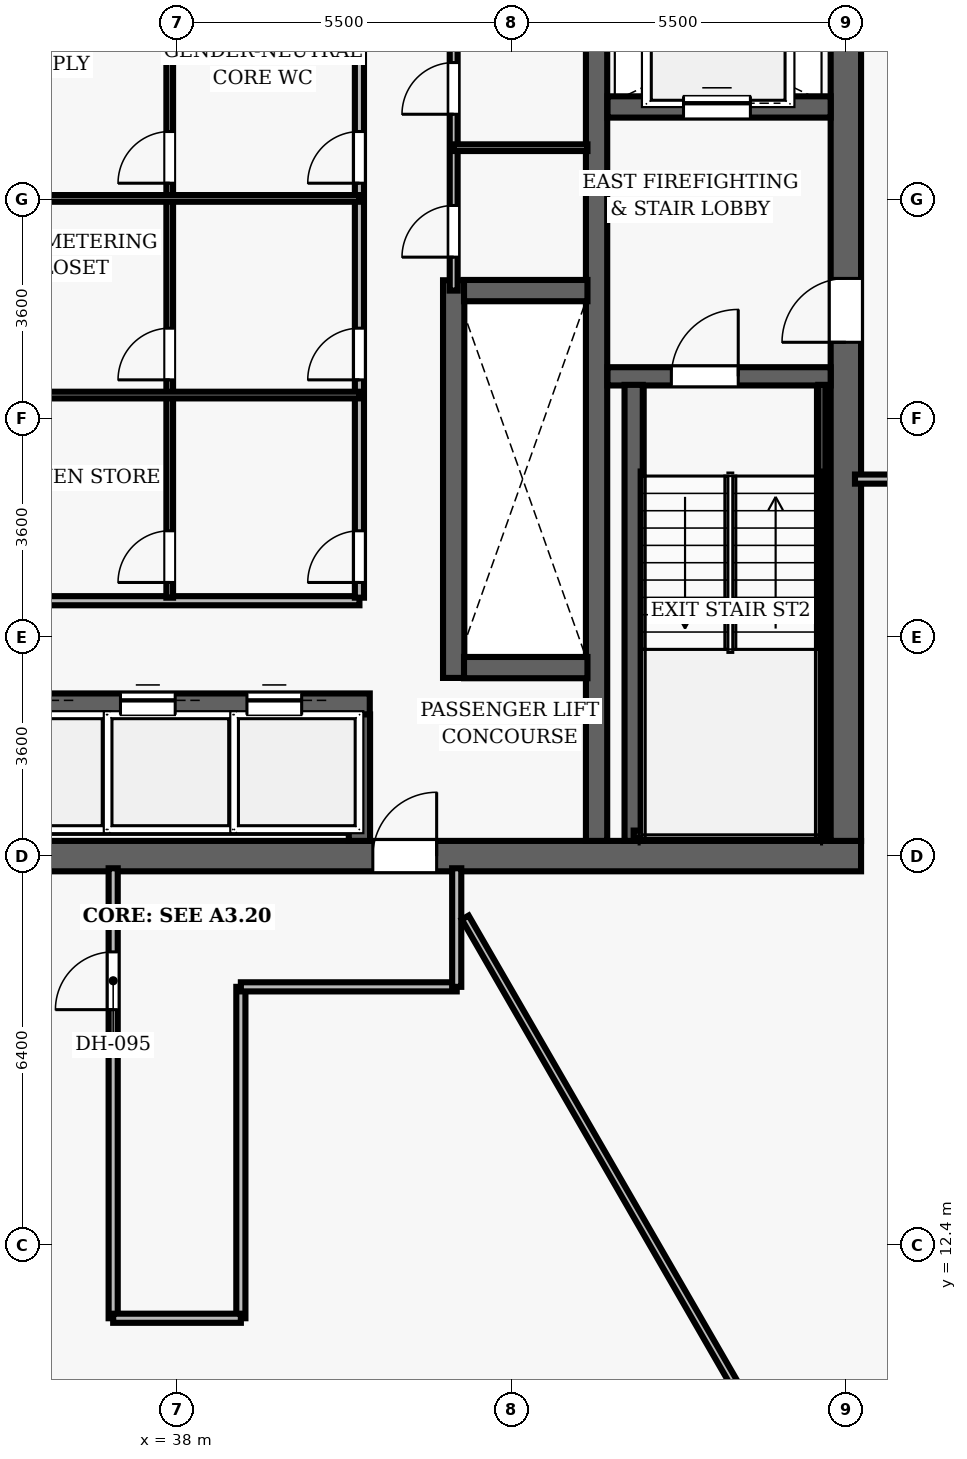
"""IFC4 building model, lengths in metres.
Left out: names, types, materials, properties, quantities, classifications, styles, units other than length and angle.
Written with IfcOpenShell. Run it as: python <this file> out.ifc"""

import sys

from ifc_helpers import new_model, si_unit, direction, frame, frame_2d, origin, place, context, subcontext, project, spatial, rectangle, extrude, element, fill, save


model = new_model("IFC4")
c1 = context("Model", 3, precision=1e-05, world=origin(), true_north=direction((0.0, 1.0)))
c2 = subcontext(c1, "Body", "Model", "MODEL_VIEW")
j1 = project(units=[si_unit("LENGTHUNIT", "METRE"), si_unit("PLANEANGLEUNIT", "RADIAN")], contexts=[c1])
p1 = place(None, origin())
s1 = spatial("IfcSite", under=j1, at=p1, CompositionType="ELEMENT")
p2 = place(p1, origin())
s2 = spatial("IfcBuilding", under=s1, at=p2, CompositionType="ELEMENT")
p3 = place(p2, frame((0.0, 0.0, 175.05)))
s3 = spatial("IfcBuildingStorey", under=s2, at=p3, CompositionType="ELEMENT", Elevation=175.05)
p4 = place(p3, frame((26.75, 18.8, 0.0), z_axis=(0.0, 0.0, 1.0), x_axis=(1.0, 0.0, 0.0)))
e1 = element("IfcWall", 1, at=p4, inside=s3, PredefinedType="SHEAR", context=c2, shape_type="SweptSolid", body=[
    extrude(rectangle(XDim=22.5, YDim=0.5, at=frame_2d((11.25, 0.0))), origin(), (0.0, 0.0, 1.0), 3.85),
])
p5 = place(p4, frame((14.47, 0.0, 0.0)))
e2 = element("IfcOpeningElement", 2, at=p5, cuts=e1, PredefinedType="OPENING", context=c2, shape_type="SweptSolid", body=[
    extrude(rectangle(XDim=1.05, YDim=2.15, at=frame_2d((0.525, 1.075))), frame((0.0, 0.26, 0.0), z_axis=(0.0, -1.0, 0.0), x_axis=(1.0, 0.0, 0.0)), (0.0, 0.0, 1.0), 0.52),
])
p6 = place(p3, frame((49.0, 19.05, 0.0), z_axis=(0.0, 0.0, 1.0), x_axis=(0.0, 1.0, 0.0)))
e3 = element("IfcWall", 3, at=p6, inside=s3, PredefinedType="SHEAR", context=c2, shape_type="SweptSolid", body=[
    extrude(rectangle(XDim=13.9, YDim=0.5, at=frame_2d((6.95, 0.0))), origin(), (0.0, 0.0, 1.0), 3.85),
])
p7 = place(p6, frame((8.2, 0.0, 0.0)))
e4 = element("IfcOpeningElement", 4, at=p7, cuts=e3, PredefinedType="OPENING", context=c2, shape_type="SweptSolid", body=[
    extrude(rectangle(XDim=1.05, YDim=2.15, at=frame_2d((0.525, 1.075))), frame((0.0, 0.26, 0.0), z_axis=(0.0, -1.0, 0.0), x_axis=(1.0, 0.0, 0.0)), (0.0, 0.0, 1.0), 0.52),
])
p8 = place(p3, frame((44.9, 19.05, 0.0), z_axis=(0.0, 0.0, 1.0), x_axis=(0.0, 1.0, 0.0)))
e5 = element("IfcWall", 5, at=p8, inside=s3, PredefinedType="SHEAR", context=c2, shape_type="SweptSolid", body=[
    extrude(rectangle(XDim=13.9, YDim=0.35, at=frame_2d((6.95, 0.0))), origin(), (0.0, 0.0, 1.0), 3.85),
])
p9 = place(p3, frame((45.08, 26.69, 0.0), z_axis=(0.0, 0.0, 1.0), x_axis=(1.0, 0.0, 0.0)))
e6 = element("IfcWall", 6, at=p9, inside=s3, PredefinedType="SHEAR", context=c2, shape_type="SweptSolid", body=[
    extrude(rectangle(XDim=3.67, YDim=0.3, at=frame_2d((1.835, 0.0))), origin(), (0.0, 0.0, 1.0), 3.85),
])
p10 = place(p9, frame((1.05, 0.0, 0.0)))
e7 = element("IfcOpeningElement", 7, at=p10, cuts=e6, PredefinedType="OPENING", context=c2, shape_type="SweptSolid", body=[
    extrude(rectangle(XDim=1.1, YDim=2.15, at=frame_2d((0.55, 1.075))), frame((0.0, 0.16, 0.0), z_axis=(0.0, -1.0, 0.0), x_axis=(1.0, 0.0, 0.0)), (0.0, 0.0, 1.0), 0.32),
])
p11 = place(p3, frame((45.51, 19.05, 0.0), z_axis=(0.0, 0.0, 1.0), x_axis=(0.0, 1.0, 0.0)))
e8 = element("IfcWall", 8, at=p11, inside=s3, PredefinedType="SHEAR", context=c2, shape_type="SweptSolid", body=[
    extrude(rectangle(XDim=7.5, YDim=0.3, at=frame_2d((3.75, 0.0))), origin(), (0.0, 0.0, 1.0), 3.85),
])
p12 = place(p3, frame((48.605, 19.1, 0.0), z_axis=(0.0, 0.0, 1.0), x_axis=(0.0, 1.0, 0.0)))
e9 = element("IfcWall", 9, at=p12, inside=s3, PredefinedType="SHEAR", context=c2, shape_type="SweptSolid", body=[
    extrude(rectangle(XDim=7.45, YDim=0.12, at=frame_2d((3.725, 0.0))), origin(), (0.0, 0.0, 1.0), 3.85),
])
p13 = place(p3, frame((45.51, 19.16, 0.0), z_axis=(0.0, 0.0, 1.0), x_axis=(1.0, 0.0, 0.0)))
e10 = element("IfcWall", 10, at=p13, inside=s3, PredefinedType="SHEAR", context=c2, shape_type="SweptSolid", body=[
    extrude(rectangle(XDim=3.095, YDim=0.12, at=frame_2d((1.547, 0.0))), origin(), (0.0, 0.0, 1.0), 3.85),
])
p14 = place(p3, frame((45.08, 31.12, 0.0), z_axis=(0.0, 0.0, 1.0), x_axis=(1.0, 0.0, 0.0)))
e11 = element("IfcWall", 11, at=p14, inside=s3, PredefinedType="SHEAR", context=c2, shape_type="SweptSolid", body=[
    extrude(rectangle(XDim=3.67, YDim=0.35, at=frame_2d((1.835, 0.0))), origin(), (0.0, 0.0, 1.0), 3.035),
])
p15 = place(p14, frame((1.25, 0.0, 0.0)))
e12 = element("IfcOpeningElement", 12, at=p15, cuts=e11, PredefinedType="OPENING", context=c2, shape_type="SweptSolid", body=[
    extrude(rectangle(XDim=1.1, YDim=2.15, at=frame_2d((0.55, 1.075))), frame((0.0, 0.185, 0.0), z_axis=(0.0, -1.0, 0.0), x_axis=(1.0, 0.0, 0.0)), (0.0, 0.0, 1.0), 0.37),
])
p16 = place(p3, frame((42.55, 21.73, 0.0), z_axis=(0.0, 0.0, 1.0), x_axis=(0.0, 1.0, 0.0)))
e13 = element("IfcWall", 13, at=p16, inside=s3, PredefinedType="SHEAR", context=c2, shape_type="SweptSolid", body=[
    extrude(rectangle(XDim=6.54, YDim=0.35, at=frame_2d((3.27, 0.0))), origin(), (0.0, 0.0, 1.0), 3.035),
])
for number, where, z_axis, x_axis in (
    (14, (42.72, 21.9, 0.0), (0.0, 0.0, 1.0), (1.0, 0.0, 0.0)),
    (15, (42.72, 28.1, 0.0), (0.0, 0.0, 1.0), (1.0, 0.0, 0.0)),
):
    element("IfcWall", number, at=place(p3, frame(where, z_axis=z_axis, x_axis=x_axis)), inside=s3, PredefinedType="SHEAR", context=c2, shape_type="SweptSolid", body=[
        extrude(rectangle(XDim=2.03, YDim=0.35, at=frame_2d((1.015, 0.0))), origin(), (0.0, 0.0, 1.0), 3.035),
    ])
p17 = place(p3, frame((34.49, 21.3, 0.0), z_axis=(0.0, 0.0, 1.0), x_axis=(1.0, 0.0, 0.0)))
e16 = element("IfcWall", 16, at=p17, inside=s3, PredefinedType="SHEAR", context=c2, shape_type="SweptSolid", body=[
    extrude(rectangle(XDim=6.68, YDim=0.35, at=frame_2d((3.34, 0.0))), origin(), (0.0, 0.0, 1.0), 3.035),
])
p18 = place(p17, frame((0.5, 0.0, 0.0)))
e17 = element("IfcOpeningElement", 17, at=p18, cuts=e16, PredefinedType="OPENING", context=c2, shape_type="SweptSolid", body=[
    extrude(rectangle(XDim=0.9, YDim=2.15, at=frame_2d((0.45, 1.075))), frame((0.0, 0.185, 0.0), z_axis=(0.0, -1.0, 0.0), x_axis=(1.0, 0.0, 0.0)), (0.0, 0.0, 1.0), 0.37),
])
p19 = place(p17, frame((2.58, 0.0, 0.0)))
e18 = element("IfcOpeningElement", 18, at=p19, cuts=e16, PredefinedType="OPENING", context=c2, shape_type="SweptSolid", body=[
    extrude(rectangle(XDim=0.9, YDim=2.15, at=frame_2d((0.45, 1.075))), frame((0.0, 0.185, 0.0), z_axis=(0.0, -1.0, 0.0), x_axis=(1.0, 0.0, 0.0)), (0.0, 0.0, 1.0), 0.37),
])
p20 = place(p17, frame((4.66, 0.0, 0.0)))
e19 = element("IfcOpeningElement", 19, at=p20, cuts=e16, PredefinedType="OPENING", context=c2, shape_type="SweptSolid", body=[
    extrude(rectangle(XDim=0.9, YDim=2.15, at=frame_2d((0.45, 1.075))), frame((0.0, 0.185, 0.0), z_axis=(0.0, -1.0, 0.0), x_axis=(1.0, 0.0, 0.0)), (0.0, 0.0, 1.0), 0.37),
])
p21 = place(p3, frame((41.0, 19.05, 0.0), z_axis=(0.0, 0.0, 1.0), x_axis=(0.0, 1.0, 0.0)))
e20 = element("IfcWall", 20, at=p21, inside=s3, PredefinedType="SHEAR", context=c2, shape_type="SweptSolid", body=[
    extrude(rectangle(XDim=2.08, YDim=0.35, at=frame_2d((1.04, 0.0))), origin(), (0.0, 0.0, 1.0), 3.035),
])
p22 = place(p3, frame((34.75, 23.0, 0.0), z_axis=(0.0, 0.0, 1.0), x_axis=(1.0, 0.0, 0.0)))
e21 = element("IfcWall", 21, at=p22, inside=s3, PredefinedType="PARTITIONING", context=c2, shape_type="SweptSolid", body=[
    extrude(rectangle(XDim=6.25, YDim=0.15, at=frame_2d((3.125, 0.0))), origin(), (0.0, 0.0, 1.0), 3.035),
])
p23 = place(p3, frame((41.0, 23.05, 0.0), z_axis=(0.0, 0.0, 1.0), x_axis=(0.0, 1.0, 0.0)))
e22 = element("IfcWall", 22, at=p23, inside=s3, PredefinedType="PARTITIONING", context=c2, shape_type="SweptSolid", body=[
    extrude(rectangle(XDim=9.8, YDim=0.15, at=frame_2d((4.9, 0.0))), origin(), (0.0, 0.0, 1.0), 3.035),
])
p24 = place(p23, frame((0.25, 0.0, 0.0)))
e23 = element("IfcOpeningElement", 23, at=p24, cuts=e22, PredefinedType="OPENING", context=c2, shape_type="SweptSolid", body=[
    extrude(rectangle(XDim=0.85, YDim=2.1, at=frame_2d((0.425, 1.05))), frame((0.0, 0.085, 0.0), z_axis=(0.0, -1.0, 0.0), x_axis=(1.0, 0.0, 0.0)), (0.0, 0.0, 1.0), 0.17),
])
p25 = place(p23, frame((3.582, 0.0, 0.0)))
e24 = element("IfcOpeningElement", 24, at=p25, cuts=e22, PredefinedType="OPENING", context=c2, shape_type="SweptSolid", body=[
    extrude(rectangle(XDim=0.85, YDim=2.1, at=frame_2d((0.425, 1.05))), frame((0.0, 0.085, 0.0), z_axis=(0.0, -1.0, 0.0), x_axis=(1.0, 0.0, 0.0)), (0.0, 0.0, 1.0), 0.17),
])
p26 = place(p23, frame((6.816, 0.0, 0.0)))
e25 = element("IfcOpeningElement", 25, at=p26, cuts=e22, PredefinedType="OPENING", context=c2, shape_type="SweptSolid", body=[
    extrude(rectangle(XDim=0.85, YDim=2.1, at=frame_2d((0.425, 1.05))), frame((0.0, 0.085, 0.0), z_axis=(0.0, -1.0, 0.0), x_axis=(1.0, 0.0, 0.0)), (0.0, 0.0, 1.0), 0.17),
])
p27 = place(p3, frame((37.88, 23.05, 0.0), z_axis=(0.0, 0.0, 1.0), x_axis=(0.0, 1.0, 0.0)))
e26 = element("IfcWall", 26, at=p27, inside=s3, PredefinedType="PARTITIONING", context=c2, shape_type="SweptSolid", body=[
    extrude(rectangle(XDim=9.8, YDim=0.11, at=frame_2d((4.9, 0.0))), origin(), (0.0, 0.0, 1.0), 3.035),
])
p28 = place(p27, frame((0.25, 0.0, 0.0)))
e27 = element("IfcOpeningElement", 27, at=p28, cuts=e26, PredefinedType="OPENING", context=c2, shape_type="SweptSolid", body=[
    extrude(rectangle(XDim=0.85, YDim=2.1, at=frame_2d((0.425, 1.05))), frame((0.0, 0.065, 0.0), z_axis=(0.0, -1.0, 0.0), x_axis=(1.0, 0.0, 0.0)), (0.0, 0.0, 1.0), 0.13),
])
p29 = place(p27, frame((3.582, 0.0, 0.0)))
e28 = element("IfcOpeningElement", 28, at=p29, cuts=e26, PredefinedType="OPENING", context=c2, shape_type="SweptSolid", body=[
    extrude(rectangle(XDim=0.85, YDim=2.1, at=frame_2d((0.425, 1.05))), frame((0.0, 0.065, 0.0), z_axis=(0.0, -1.0, 0.0), x_axis=(1.0, 0.0, 0.0)), (0.0, 0.0, 1.0), 0.13),
])
p30 = place(p27, frame((6.816, 0.0, 0.0)))
e29 = element("IfcOpeningElement", 29, at=p30, cuts=e26, PredefinedType="OPENING", context=c2, shape_type="SweptSolid", body=[
    extrude(rectangle(XDim=0.85, YDim=2.1, at=frame_2d((0.425, 1.05))), frame((0.0, 0.065, 0.0), z_axis=(0.0, -1.0, 0.0), x_axis=(1.0, 0.0, 0.0)), (0.0, 0.0, 1.0), 0.13),
])
for number, where, z_axis, x_axis in (
    (30, (34.75, 26.382, 0.0), (0.0, 0.0, 1.0), (1.0, 0.0, 0.0)),
    (31, (34.75, 29.616, 0.0), (0.0, 0.0, 1.0), (1.0, 0.0, 0.0)),
):
    element("IfcWall", number, at=place(p3, frame(where, z_axis=z_axis, x_axis=x_axis)), inside=s3, PredefinedType="PARTITIONING", context=c2, shape_type="SweptSolid", body=[
        extrude(rectangle(XDim=6.25, YDim=0.11, at=frame_2d((3.125, 0.0))), origin(), (0.0, 0.0, 1.0), 3.035),
    ])
p31 = place(p3, frame((42.55, 28.1, 0.0), z_axis=(0.0, 0.0, 1.0), x_axis=(0.0, 1.0, 0.0)))
e32 = element("IfcWall", 32, at=p31, inside=s3, PredefinedType="PARTITIONING", context=c2, shape_type="SweptSolid", body=[
    extrude(rectangle(XDim=4.75, YDim=0.13, at=frame_2d((2.375, 0.0))), origin(), (0.0, 0.0, 1.0), 3.035),
])
p32 = place(p31, frame((0.55, 0.0, 0.0)))
e33 = element("IfcOpeningElement", 33, at=p32, cuts=e32, PredefinedType="OPENING", context=c2, shape_type="SweptSolid", body=[
    extrude(rectangle(XDim=0.85, YDim=2.1, at=frame_2d((0.425, 1.05))), frame((0.0, 0.075, 0.0), z_axis=(0.0, -1.0, 0.0), x_axis=(1.0, 0.0, 0.0)), (0.0, 0.0, 1.0), 0.15),
])
p33 = place(p31, frame((2.9, 0.0, 0.0)))
e34 = element("IfcOpeningElement", 34, at=p33, cuts=e32, PredefinedType="OPENING", context=c2, shape_type="SweptSolid", body=[
    extrude(rectangle(XDim=0.85, YDim=2.1, at=frame_2d((0.425, 1.05))), frame((0.0, 0.075, 0.0), z_axis=(0.0, -1.0, 0.0), x_axis=(1.0, 0.0, 0.0)), (0.0, 0.0, 1.0), 0.15),
])
p34 = place(p3, frame((42.55, 30.45, 0.0), z_axis=(0.0, 0.0, 1.0), x_axis=(1.0, 0.0, 0.0)))
e35 = element("IfcWall", 35, at=p34, inside=s3, PredefinedType="PARTITIONING", context=c2, shape_type="SweptSolid", body=[
    extrude(rectangle(XDim=2.2, YDim=0.11, at=frame_2d((1.1, 0.0))), origin(), (0.0, 0.0, 1.0), 3.035),
])
p35 = place(p3, frame((49.15, 25.0, 0.0), z_axis=(0.0, 0.0, 1.0), x_axis=(1.0, 0.0, 0.0)))
e36 = element("IfcWall", 36, at=p35, inside=s3, PredefinedType="PARTITIONING", context=c2, shape_type="SweptSolid", body=[
    extrude(rectangle(XDim=11.303, YDim=0.15, at=frame_2d((5.652, 0.0))), origin(), (0.0, 0.0, 1.0), 3.035),
])
p36 = place(p35, frame((2.351, 0.0, 0.0)))
e37 = element("IfcOpeningElement", 37, at=p36, cuts=e36, PredefinedType="OPENING", context=c2, shape_type="SweptSolid", body=[
    extrude(rectangle(XDim=0.95, YDim=2.15, at=frame_2d((0.475, 1.075))), frame((0.0, 0.085, 0.0), z_axis=(0.0, -1.0, 0.0), x_axis=(1.0, 0.0, 0.0)), (0.0, 0.0, 1.0), 0.17),
])
p37 = place(p3, frame((36.95, 11.2, 0.0), z_axis=(0.0, 0.0, 1.0), x_axis=(0.0, 1.0, 0.0)))
e38 = element("IfcWall", 38, at=p37, inside=s3, PredefinedType="PARTITIONING", context=c2, shape_type="SweptSolid", body=[
    extrude(rectangle(XDim=7.4, YDim=0.15, at=frame_2d((3.7, 0.0))), origin(), (0.0, 0.0, 1.0), 3.035),
])
p38 = place(p37, frame((5.075, 0.0, 0.0)))
e39 = element("IfcOpeningElement", 39, at=p38, cuts=e38, PredefinedType="OPENING", context=c2, shape_type="SweptSolid", body=[
    extrude(rectangle(XDim=0.95, YDim=2.15, at=frame_2d((0.475, 1.075))), frame((0.0, 0.085, 0.0), z_axis=(0.0, -1.0, 0.0), x_axis=(1.0, 0.0, 0.0)), (0.0, 0.0, 1.0), 0.17),
])
p39 = place(p3, frame((39.05, 11.2, 0.0), z_axis=(0.0, 0.0, 1.0), x_axis=(0.0, 1.0, 0.0)))
e40 = element("IfcWall", 40, at=p39, inside=s3, PredefinedType="PARTITIONING", context=c2, shape_type="SweptSolid", body=[
    extrude(rectangle(XDim=5.45, YDim=0.15, at=frame_2d((2.725, 0.0))), origin(), (0.0, 0.0, 1.0), 3.035),
])
p40 = place(p3, frame((39.05, 16.65, 0.0), z_axis=(0.0, 0.0, 1.0), x_axis=(1.0, 0.0, 0.0)))
e41 = element("IfcWall", 41, at=p40, inside=s3, PredefinedType="PARTITIONING", context=c2, shape_type="SweptSolid", body=[
    extrude(rectangle(XDim=3.55, YDim=0.15, at=frame_2d((1.775, 0.0))), origin(), (0.0, 0.0, 1.0), 3.035),
])
p41 = place(p3, frame((42.6, 16.65, 0.0), z_axis=(0.0, 0.0, 1.0), x_axis=(0.0, 1.0, 0.0)))
e42 = element("IfcWall", 42, at=p41, inside=s3, PredefinedType="PARTITIONING", context=c2, shape_type="SweptSolid", body=[
    extrude(rectangle(XDim=1.95, YDim=0.15, at=frame_2d((0.975, 0.0))), origin(), (0.0, 0.0, 1.0), 3.035),
])
p42 = place(p3, frame((36.95, 11.2, 0.0), z_axis=(0.0, 0.0, 1.0), x_axis=(1.0, 0.0, 0.0)))
e43 = element("IfcWall", 43, at=p42, inside=s3, PredefinedType="PARTITIONING", context=c2, shape_type="SweptSolid", body=[
    extrude(rectangle(XDim=2.1, YDim=0.15, at=frame_2d((1.05, 0.0))), origin(), (0.0, 0.0, 1.0), 3.035),
])
p43 = place(p3, frame((42.74, 17.79, 0.0), z_axis=(0.0, 0.0, 1.0), x_axis=(0.4999998082, -0.86602551452, 0.0)))
e44 = element("IfcWall", 44, at=p43, inside=s3, PredefinedType="PARTITIONING", context=c2, shape_type="SweptSolid", body=[
    extrude(rectangle(XDim=16.738, YDim=0.13, at=frame_2d((8.369, 0.0))), origin(), (0.0, 0.0, 1.0), 3.035),
])
p44 = place(p10, origin())
e45 = element("IfcDoor", 45, at=p44, inside=s3, OperationType="SINGLE_SWING_RIGHT", PredefinedType="DOOR", context=c2, shape_type="SweptSolid", body=[
    extrude(rectangle(XDim=1.1, YDim=2.15, at=frame_2d((0.55, 1.075))), frame((0.0, 0.025, 0.0), z_axis=(0.0, -1.0, 0.0), x_axis=(1.0, 0.0, 0.0)), (0.0, 0.0, 1.0), 0.05),
])
fill(e7, e45)
p45 = place(p7, origin())
e46 = element("IfcDoor", 46, at=p45, inside=s3, OperationType="SINGLE_SWING_LEFT", PredefinedType="DOOR", context=c2, shape_type="SweptSolid", body=[
    extrude(rectangle(XDim=1.05, YDim=2.15, at=frame_2d((0.525, 1.075))), frame((0.0, 0.025, 0.0), z_axis=(0.0, -1.0, 0.0), x_axis=(1.0, 0.0, 0.0)), (0.0, 0.0, 1.0), 0.05),
])
fill(e4, e46)
p46 = place(p5, origin())
e47 = element("IfcDoor", 47, at=p46, inside=s3, OperationType="SINGLE_SWING_RIGHT", PredefinedType="DOOR", context=c2, shape_type="SweptSolid", body=[
    extrude(rectangle(XDim=1.05, YDim=2.15, at=frame_2d((0.525, 1.075))), frame((0.0, 0.025, 0.0), z_axis=(0.0, -1.0, 0.0), x_axis=(1.0, 0.0, 0.0)), (0.0, 0.0, 1.0), 0.05),
])
fill(e2, e47)
p47 = place(p24, origin())
e48 = element("IfcDoor", 48, at=p47, inside=s3, OperationType="SINGLE_SWING_LEFT", PredefinedType="DOOR", context=c2, shape_type="SweptSolid", body=[
    extrude(rectangle(XDim=0.85, YDim=2.1, at=frame_2d((0.425, 1.05))), frame((0.0, 0.025, 0.0), z_axis=(0.0, -1.0, 0.0), x_axis=(1.0, 0.0, 0.0)), (0.0, 0.0, 1.0), 0.05),
])
fill(e23, e48)
p48 = place(p28, origin())
e49 = element("IfcDoor", 49, at=p48, inside=s3, OperationType="SINGLE_SWING_LEFT", PredefinedType="DOOR", context=c2, shape_type="SweptSolid", body=[
    extrude(rectangle(XDim=0.85, YDim=2.1, at=frame_2d((0.425, 1.05))), frame((0.0, 0.025, 0.0), z_axis=(0.0, -1.0, 0.0), x_axis=(1.0, 0.0, 0.0)), (0.0, 0.0, 1.0), 0.05),
])
fill(e27, e49)
p49 = place(p25, origin())
e50 = element("IfcDoor", 50, at=p49, inside=s3, OperationType="SINGLE_SWING_LEFT", PredefinedType="DOOR", context=c2, shape_type="SweptSolid", body=[
    extrude(rectangle(XDim=0.85, YDim=2.1, at=frame_2d((0.425, 1.05))), frame((0.0, 0.025, 0.0), z_axis=(0.0, -1.0, 0.0), x_axis=(1.0, 0.0, 0.0)), (0.0, 0.0, 1.0), 0.05),
])
fill(e24, e50)
p50 = place(p29, origin())
e51 = element("IfcDoor", 51, at=p50, inside=s3, OperationType="SINGLE_SWING_LEFT", PredefinedType="DOOR", context=c2, shape_type="SweptSolid", body=[
    extrude(rectangle(XDim=0.85, YDim=2.1, at=frame_2d((0.425, 1.05))), frame((0.0, 0.025, 0.0), z_axis=(0.0, -1.0, 0.0), x_axis=(1.0, 0.0, 0.0)), (0.0, 0.0, 1.0), 0.05),
])
fill(e28, e51)
p51 = place(p26, origin())
e52 = element("IfcDoor", 52, at=p51, inside=s3, OperationType="SINGLE_SWING_LEFT", PredefinedType="DOOR", context=c2, shape_type="SweptSolid", body=[
    extrude(rectangle(XDim=0.85, YDim=2.1, at=frame_2d((0.425, 1.05))), frame((0.0, 0.025, 0.0), z_axis=(0.0, -1.0, 0.0), x_axis=(1.0, 0.0, 0.0)), (0.0, 0.0, 1.0), 0.05),
])
fill(e25, e52)
p52 = place(p30, origin())
e53 = element("IfcDoor", 53, at=p52, inside=s3, OperationType="SINGLE_SWING_LEFT", PredefinedType="DOOR", context=c2, shape_type="SweptSolid", body=[
    extrude(rectangle(XDim=0.85, YDim=2.1, at=frame_2d((0.425, 1.05))), frame((0.0, 0.025, 0.0), z_axis=(0.0, -1.0, 0.0), x_axis=(1.0, 0.0, 0.0)), (0.0, 0.0, 1.0), 0.05),
])
fill(e29, e53)
p53 = place(p32, origin())
e54 = element("IfcDoor", 54, at=p53, inside=s3, OperationType="SINGLE_SWING_LEFT", PredefinedType="DOOR", context=c2, shape_type="SweptSolid", body=[
    extrude(rectangle(XDim=0.85, YDim=2.1, at=frame_2d((0.425, 1.05))), frame((0.0, 0.025, 0.0), z_axis=(0.0, -1.0, 0.0), x_axis=(1.0, 0.0, 0.0)), (0.0, 0.0, 1.0), 0.05),
])
fill(e33, e54)
p54 = place(p33, origin())
e55 = element("IfcDoor", 55, at=p54, inside=s3, OperationType="SINGLE_SWING_LEFT", PredefinedType="DOOR", context=c2, shape_type="SweptSolid", body=[
    extrude(rectangle(XDim=0.85, YDim=2.1, at=frame_2d((0.425, 1.05))), frame((0.0, 0.025, 0.0), z_axis=(0.0, -1.0, 0.0), x_axis=(1.0, 0.0, 0.0)), (0.0, 0.0, 1.0), 0.05),
])
fill(e34, e55)
p55 = place(p38, origin())
e56 = element("IfcDoor", 56, at=p55, inside=s3, OperationType="SINGLE_SWING_LEFT", PredefinedType="DOOR", context=c2, shape_type="SweptSolid", body=[
    extrude(rectangle(XDim=0.95, YDim=2.15, at=frame_2d((0.475, 1.075))), frame((0.0, 0.025, 0.0), z_axis=(0.0, -1.0, 0.0), x_axis=(1.0, 0.0, 0.0)), (0.0, 0.0, 1.0), 0.05),
])
fill(e39, e56)
p56 = place(p19, origin())
e57 = element("IfcDoor", 57, at=p56, inside=s3, OperationType="SLIDING_TO_LEFT", PredefinedType="DOOR", context=c2, shape_type="SweptSolid", body=[
    extrude(rectangle(XDim=0.9, YDim=2.15, at=frame_2d((0.45, 1.075))), frame((0.0, 0.025, 0.0), z_axis=(0.0, -1.0, 0.0), x_axis=(1.0, 0.0, 0.0)), (0.0, 0.0, 1.0), 0.05),
])
fill(e18, e57)
p57 = place(p20, origin())
e58 = element("IfcDoor", 58, at=p57, inside=s3, OperationType="SLIDING_TO_LEFT", PredefinedType="DOOR", context=c2, shape_type="SweptSolid", body=[
    extrude(rectangle(XDim=0.9, YDim=2.15, at=frame_2d((0.45, 1.075))), frame((0.0, 0.025, 0.0), z_axis=(0.0, -1.0, 0.0), x_axis=(1.0, 0.0, 0.0)), (0.0, 0.0, 1.0), 0.05),
])
fill(e19, e58)
p58 = place(p15, origin())
e59 = element("IfcDoor", 59, at=p58, inside=s3, OperationType="SLIDING_TO_LEFT", PredefinedType="DOOR", context=c2, shape_type="SweptSolid", body=[
    extrude(rectangle(XDim=1.1, YDim=2.15, at=frame_2d((0.55, 1.075))), frame((0.0, 0.025, 0.0), z_axis=(0.0, -1.0, 0.0), x_axis=(1.0, 0.0, 0.0)), (0.0, 0.0, 1.0), 0.05),
])
fill(e12, e59)
save(model, sys.argv[1])
